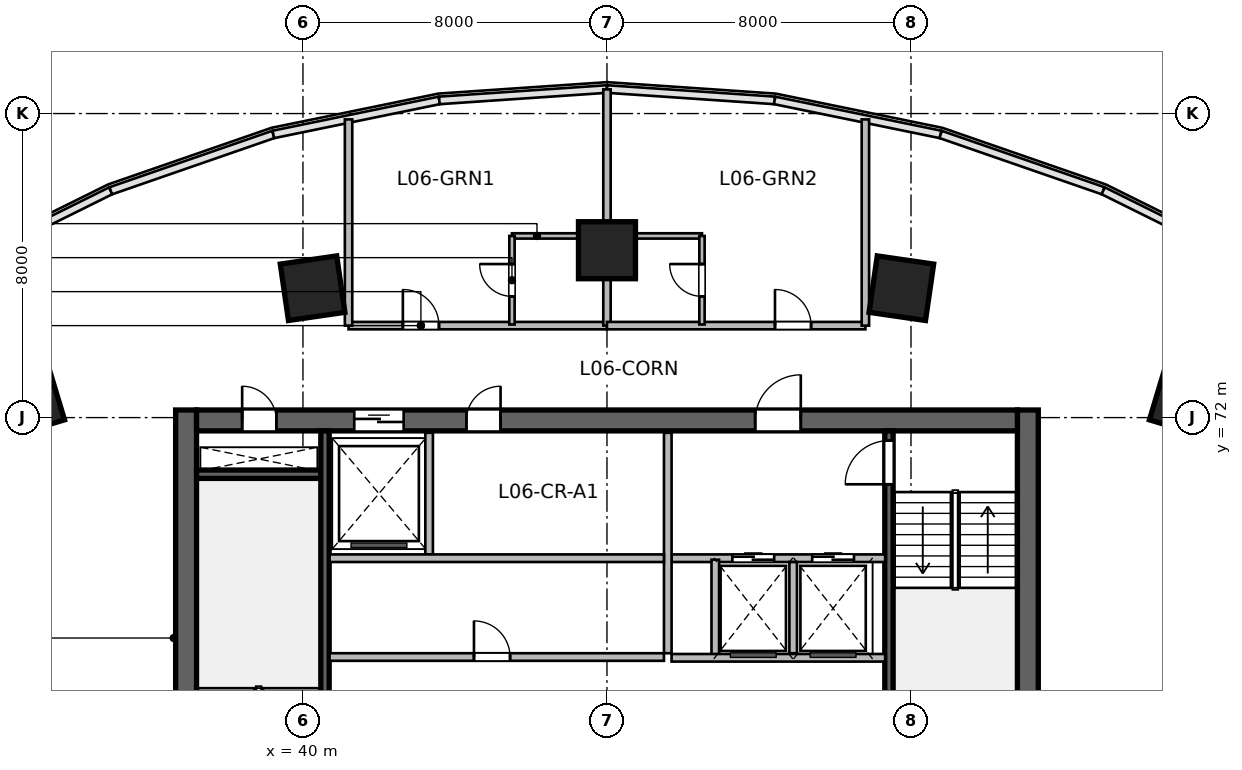
"""IFC4 building model, lengths in metres.
Left out: names, types, materials, properties, quantities, classifications, styles, units other than length and angle.
Written with IfcOpenShell. Run it as: python <this file> out.ifc"""

import sys

from ifc_helpers import new_model, si_unit, direction, frame, frame_2d, origin, origin_2d, place, context, subcontext, project, spatial, rectangle, extrude, source, transform, mapped, element, fill, save


model = new_model("IFC4")
c1 = context("Model", 3, precision=1e-05, world=origin(), true_north=direction((0.0, 1.0)))
c2 = subcontext(c1, "Body", "Model", "MODEL_VIEW")
j1 = project(units=[si_unit("LENGTHUNIT", "METRE"), si_unit("PLANEANGLEUNIT", "RADIAN")], contexts=[c1])
p1 = place(None, origin())
s1 = spatial("IfcSite", under=j1, at=p1, CompositionType="ELEMENT")
p2 = place(p1, origin())
s2 = spatial("IfcBuilding", under=s1, at=p2, CompositionType="ELEMENT")
p3 = place(p2, frame((0.0, 0.0, 35.4)))
s3 = spatial("IfcBuildingStorey", under=s2, at=p3, CompositionType="ELEMENT", Elevation=35.4)
m1 = source(origin(), c2, "Body", "SweptSolid", [
    extrude(rectangle(XDim=12.0, YDim=0.55, at=frame_2d((6.0, 0.0))), origin(), (0.0, 0.0, 1.0), 3.6),
])
for number, where, z_axis, x_axis in (
    (1, (36.925, 60.2, 0.0), (0.0, 0.0, 1.0), (0.0, 1.0, 0.0)),
    (2, (59.075, 60.2, 0.0), (0.0, 0.0, 1.0), (0.0, 1.0, 0.0)),
):
    element("IfcWall", number, at=place(p3, frame(where, z_axis=z_axis, x_axis=x_axis)), inside=s3, PredefinedType="SHEAR", context=c2, shape_type="MappedRepresentation", body=[
        mapped(m1, transform((0.0, 0.0, 0.0), scale=1.0)),
    ])
m2 = source(origin(), c2, "Body", "SweptSolid", [
    extrude(rectangle(XDim=21.6, YDim=0.55, at=frame_2d((10.8, 0.0))), origin(), (0.0, 0.0, 1.0), 3.6),
])
p4 = place(p3, frame((37.2, 71.925, 0.0), z_axis=(0.0, 0.0, 1.0), x_axis=(1.0, 0.0, 0.0)))
e3 = element("IfcWall", 3, at=p4, inside=s3, PredefinedType="SHEAR", context=c2, shape_type="MappedRepresentation", body=[
    mapped(m2, transform((0.0, 0.0, 0.0), scale=1.0)),
])
p5 = place(p4, frame((1.2, 0.0, 0.0)))
e4 = element("IfcOpeningElement", 4, at=p5, cuts=e3, PredefinedType="OPENING", context=c2, shape_type="SweptSolid", body=[
    extrude(rectangle(XDim=0.9, YDim=2.1, at=frame_2d((0.45, 1.05))), frame((0.0, 0.285, 0.0), z_axis=(0.0, -1.0, 0.0), x_axis=(1.0, 0.0, 0.0)), (0.0, 0.0, 1.0), 0.57),
])
p6 = place(p4, frame((14.7, 0.0, 0.0)))
e5 = element("IfcOpeningElement", 5, at=p6, cuts=e3, PredefinedType="OPENING", context=c2, shape_type="SweptSolid", body=[
    extrude(rectangle(XDim=1.2, YDim=2.15, at=frame_2d((0.6, 1.075))), frame((0.0, 0.285, 0.0), z_axis=(0.0, -1.0, 0.0), x_axis=(1.0, 0.0, 0.0)), (0.0, 0.0, 1.0), 0.57),
])
p7 = place(p4, frame((4.15, 0.0, 0.0)))
e6 = element("IfcOpeningElement", 6, at=p7, cuts=e3, PredefinedType="OPENING", context=c2, shape_type="SweptSolid", body=[
    extrude(rectangle(XDim=1.3, YDim=2.15, at=frame_2d((0.65, 1.075))), frame((0.0, 0.285, 0.0), z_axis=(0.0, -1.0, 0.0), x_axis=(1.0, 0.0, 0.0)), (0.0, 0.0, 1.0), 0.57),
])
p8 = place(p4, frame((7.1, 0.0, 0.0)))
e7 = element("IfcOpeningElement", 7, at=p8, cuts=e3, PredefinedType="OPENING", context=c2, shape_type="SweptSolid", body=[
    extrude(rectangle(XDim=0.9, YDim=2.1, at=frame_2d((0.45, 1.05))), frame((0.0, 0.285, 0.0), z_axis=(0.0, -1.0, 0.0), x_axis=(1.0, 0.0, 0.0)), (0.0, 0.0, 1.0), 0.57),
])
m3 = source(origin(), c2, "Body", "SweptSolid", [
    extrude(rectangle(XDim=3.27, YDim=0.22, at=frame_2d((1.635, 0.0))), origin(), (0.0, 0.0, 1.0), 3.6),
])
p9 = place(p3, frame((37.2, 70.51, 0.0), z_axis=(0.0, 0.0, 1.0), x_axis=(1.0, 0.0, 0.0)))
e8 = element("IfcWall", 8, at=p9, inside=s3, PredefinedType="SHEAR", context=c2, shape_type="MappedRepresentation", body=[
    mapped(m3, transform((0.0, 0.0, 0.0), scale=1.0)),
])
m4 = source(origin(), c2, "Body", "SweptSolid", [
    extrude(rectangle(XDim=10.9, YDim=0.22, at=frame_2d((5.45, 0.0))), origin(), (0.0, 0.0, 1.0), 3.6),
])
p10 = place(p3, frame((40.58, 60.75, 0.0), z_axis=(0.0, 0.0, 1.0), x_axis=(0.0, 1.0, 0.0)))
e9 = element("IfcWall", 9, at=p10, inside=s3, PredefinedType="SHEAR", context=c2, shape_type="MappedRepresentation", body=[
    mapped(m4, transform((0.0, 0.0, 0.0), scale=1.0)),
])
p11 = place(p3, frame((55.42, 60.75, 0.0), z_axis=(0.0, 0.0, 1.0), x_axis=(0.0, 1.0, 0.0)))
e10 = element("IfcWall", 10, at=p11, inside=s3, PredefinedType="SHEAR", context=c2, shape_type="MappedRepresentation", body=[
    mapped(m4, transform((0.0, 0.0, 0.0), scale=1.0)),
])
p12 = place(p11, frame((9.495, 0.0, 0.0)))
e11 = element("IfcOpeningElement", 11, at=p12, cuts=e10, PredefinedType="OPENING", context=c2, shape_type="SweptSolid", body=[
    extrude(rectangle(XDim=1.15, YDim=2.15, at=frame_2d((0.575, 1.075))), frame((0.0, 0.12, 0.0), z_axis=(0.0, -1.0, 0.0), x_axis=(1.0, 0.0, 0.0)), (0.0, 0.0, 1.0), 0.24),
])
m5 = source(origin(), c2, "Body", "SweptSolid", [
    extrude(rectangle(XDim=1.5, YDim=1.5, at=origin_2d()), origin(), (0.0, 0.0, 1.0), 3.6),
])
for number, where, z_axis, x_axis in (
    (12, (32.791, 72.442, 0.0), (0.0, 0.0, 1.0), (-0.289, 0.957, 0.0)),
    (13, (40.253, 75.404, 0.0), (0.0, 0.0, 1.0), (-0.143, 0.99, 0.0)),
    (14, (48.0, 76.404, 0.0), (0.0, 0.0, 1.0), (0.0, 1.0, 0.0)),
    (15, (55.747, 75.404, 0.0), (0.0, 0.0, 1.0), (0.143, 0.99, 0.0)),
    (16, (63.209, 72.442, 0.0), (0.0, 0.0, 1.0), (0.289, 0.957, 0.0)),
):
    element("IfcColumn", number, at=place(p3, frame(where, z_axis=z_axis, x_axis=x_axis)), inside=s3, PredefinedType="COLUMN", context=c2, shape_type="MappedRepresentation", body=[
        mapped(m5, transform((0.0, 0.0, 0.0), scale=1.0)),
    ])
m6 = source(origin(), c2, "Body", "SweptSolid", [
    extrude(rectangle(XDim=5.62, YDim=0.2, at=frame_2d((2.81, 0.0))), origin(), (0.0, 0.0, 1.0), 3.36),
])
p13 = place(p3, frame((49.7, 68.3, 0.0), z_axis=(0.0, 0.0, 1.0), x_axis=(1.0, 0.0, 0.0)))
e17 = element("IfcWall", 17, at=p13, inside=s3, PredefinedType="SOLIDWALL", context=c2, shape_type="MappedRepresentation", body=[
    mapped(m6, transform((0.0, 0.0, 0.0), scale=1.0)),
])
p14 = place(p13, frame((1.6, 0.0, 0.0)))
e18 = element("IfcOpeningElement", 18, at=p14, cuts=e17, PredefinedType="OPENING", context=c2, shape_type="SweptSolid", body=[
    extrude(rectangle(XDim=1.1, YDim=2.15, at=frame_2d((0.55, 1.075))), frame((0.0, 0.11, 0.0), z_axis=(0.0, -1.0, 0.0), x_axis=(1.0, 0.0, 0.0)), (0.0, 0.0, 1.0), 0.22),
])
p15 = place(p13, frame((3.7, 0.0, 0.0)))
e19 = element("IfcOpeningElement", 19, at=p15, cuts=e17, PredefinedType="OPENING", context=c2, shape_type="SweptSolid", body=[
    extrude(rectangle(XDim=1.1, YDim=2.15, at=frame_2d((0.55, 1.075))), frame((0.0, 0.11, 0.0), z_axis=(0.0, -1.0, 0.0), x_axis=(1.0, 0.0, 0.0)), (0.0, 0.0, 1.0), 0.22),
])
m7 = source(origin(), c2, "Body", "SweptSolid", [
    extrude(rectangle(XDim=5.8, YDim=0.2, at=frame_2d((2.9, 0.0))), origin(), (0.0, 0.0, 1.0), 3.36),
])
p16 = place(p3, frame((49.6, 65.8, 0.0), z_axis=(0.0, 0.0, 1.0), x_axis=(0.0, 1.0, 0.0)))
e20 = element("IfcWall", 20, at=p16, inside=s3, PredefinedType="SOLIDWALL", context=c2, shape_type="MappedRepresentation", body=[
    mapped(m7, transform((0.0, 0.0, 0.0), scale=1.0)),
])
m8 = source(origin(), c2, "Body", "SweptSolid", [
    extrude(rectangle(XDim=2.58, YDim=0.2, at=frame_2d((1.29, 0.0))), origin(), (0.0, 0.0, 1.0), 3.36),
])
p17 = place(p3, frame((50.85, 65.68, 0.0), z_axis=(0.0, 0.0, 1.0), x_axis=(0.0, 1.0, 0.0)))
e21 = element("IfcWall", 21, at=p17, inside=s3, PredefinedType="SOLIDWALL", context=c2, shape_type="MappedRepresentation", body=[
    mapped(m8, transform((0.0, 0.0, 0.0), scale=1.0)),
])
m9 = source(origin(), c2, "Body", "SweptSolid", [
    extrude(rectangle(XDim=2.4, YDim=0.2, at=frame_2d((1.2, 0.0))), origin(), (0.0, 0.0, 1.0), 3.36),
])
p18 = place(p3, frame((52.9, 65.8, 0.0), z_axis=(0.0, 0.0, 1.0), x_axis=(0.0, 1.0, 0.0)))
e22 = element("IfcWall", 22, at=p18, inside=s3, PredefinedType="SOLIDWALL", context=c2, shape_type="MappedRepresentation", body=[
    mapped(m9, transform((0.0, 0.0, 0.0), scale=1.0)),
])
p19 = place(p3, frame((49.7, 65.68, 0.0), z_axis=(0.0, 0.0, 1.0), x_axis=(1.0, 0.0, 0.0)))
e23 = element("IfcWall", 23, at=p19, inside=s3, PredefinedType="SOLIDWALL", context=c2, shape_type="MappedRepresentation", body=[
    mapped(m6, transform((0.0, 0.0, 0.0), scale=1.0)),
])
m10 = source(origin(), c2, "Body", "SweptSolid", [
    extrude(rectangle(XDim=3.2, YDim=0.2, at=frame_2d((1.6, 0.0))), origin(), (0.0, 0.0, 1.0), 3.36),
])
p20 = place(p3, frame((43.32, 68.4, 0.0), z_axis=(0.0, 0.0, 1.0), x_axis=(0.0, 1.0, 0.0)))
e24 = element("IfcWall", 24, at=p20, inside=s3, PredefinedType="SOLIDWALL", context=c2, shape_type="MappedRepresentation", body=[
    mapped(m10, transform((0.0, 0.0, 0.0), scale=1.0)),
])
m11 = source(origin(), c2, "Body", "SweptSolid", [
    extrude(rectangle(XDim=8.8, YDim=0.2, at=frame_2d((4.4, 0.0))), origin(), (0.0, 0.0, 1.0), 3.36),
])
p21 = place(p3, frame((40.7, 68.3, 0.0), z_axis=(0.0, 0.0, 1.0), x_axis=(1.0, 0.0, 0.0)))
e25 = element("IfcWall", 25, at=p21, inside=s3, PredefinedType="SOLIDWALL", context=c2, shape_type="MappedRepresentation", body=[
    mapped(m11, transform((0.0, 0.0, 0.0), scale=1.0)),
])
p22 = place(p3, frame((40.7, 65.7, 0.0), z_axis=(0.0, 0.0, 1.0), x_axis=(1.0, 0.0, 0.0)))
e26 = element("IfcWall", 26, at=p22, inside=s3, PredefinedType="SOLIDWALL", context=c2, shape_type="MappedRepresentation", body=[
    mapped(m11, transform((0.0, 0.0, 0.0), scale=1.0)),
])
p23 = place(p22, frame((3.8, 0.0, 0.0)))
e27 = element("IfcOpeningElement", 27, at=p23, cuts=e26, PredefinedType="OPENING", context=c2, shape_type="SweptSolid", body=[
    extrude(rectangle(XDim=0.95, YDim=2.15, at=frame_2d((0.475, 1.075))), frame((0.0, 0.11, 0.0), z_axis=(0.0, -1.0, 0.0), x_axis=(1.0, 0.0, 0.0)), (0.0, 0.0, 1.0), 0.22),
])
m12 = source(origin(), c2, "Body", "SweptSolid", [
    extrude(rectangle(XDim=6.8, YDim=0.195, at=frame_2d((3.4, 0.0))), origin(), (0.0, 0.0, 1.0), 3.36),
])
p24 = place(p3, frame((41.2, 74.42, 0.0), z_axis=(0.0, 0.0, 1.0), x_axis=(1.0, 0.0, 0.0)))
e28 = element("IfcWall", 28, at=p24, inside=s3, PredefinedType="PARTITIONING", context=c2, shape_type="MappedRepresentation", body=[
    mapped(m12, transform((0.0, 0.0, 0.0), scale=1.0)),
])
p25 = place(p24, frame((1.429, 0.0, 0.0)))
e29 = element("IfcOpeningElement", 29, at=p25, cuts=e28, PredefinedType="OPENING", context=c2, shape_type="SweptSolid", body=[
    extrude(rectangle(XDim=0.95, YDim=2.15, at=frame_2d((0.475, 1.075))), frame((0.0, 0.107, 0.0), z_axis=(0.0, -1.0, 0.0), x_axis=(1.0, 0.0, 0.0)), (0.0, 0.0, 1.0), 0.215),
])
m13 = source(origin(), c2, "Body", "SweptSolid", [
    extrude(rectangle(XDim=6.216, YDim=0.195, at=frame_2d((3.108, 0.0))), origin(), (0.0, 0.0, 1.0), 2.644),
])
p26 = place(p3, frame((48.0, 74.42, 0.0), z_axis=(0.0, 0.0, 1.0), x_axis=(0.0, 1.0, 0.0)))
e30 = element("IfcWall", 30, at=p26, inside=s3, PredefinedType="PARTITIONING", context=c2, shape_type="MappedRepresentation", body=[
    mapped(m13, transform((0.0, 0.0, 0.0), scale=1.0)),
])
m14 = source(origin(), c2, "Body", "SweptSolid", [
    extrude(rectangle(XDim=5.426, YDim=0.195, at=frame_2d((2.713, 0.0))), origin(), (0.0, 0.0, 1.0), 3.36),
])
p27 = place(p3, frame((41.2, 74.42, 0.0), z_axis=(0.0, 0.0, 1.0), x_axis=(0.0, 1.0, 0.0)))
e31 = element("IfcWall", 31, at=p27, inside=s3, PredefinedType="PARTITIONING", context=c2, shape_type="MappedRepresentation", body=[
    mapped(m14, transform((0.0, 0.0, 0.0), scale=1.0)),
])
m15 = source(origin(), c2, "Body", "SweptSolid", [
    extrude(rectangle(XDim=2.35, YDim=0.14, at=frame_2d((1.175, 0.0))), origin(), (0.0, 0.0, 1.0), 3.36),
])
p28 = place(p3, frame((45.5, 76.78, 0.0), z_axis=(0.0, 0.0, 1.0), x_axis=(1.0, 0.0, 0.0)))
e32 = element("IfcWall", 32, at=p28, inside=s3, PredefinedType="PARTITIONING", context=c2, shape_type="MappedRepresentation", body=[
    mapped(m15, transform((0.0, 0.0, 0.0), scale=1.0)),
])
m16 = source(origin(), c2, "Body", "SweptSolid", [
    extrude(rectangle(XDim=2.33, YDim=0.14, at=frame_2d((1.165, 0.0))), origin(), (0.0, 0.0, 1.0), 3.36),
])
p29 = place(p3, frame((45.5, 74.45, 0.0), z_axis=(0.0, 0.0, 1.0), x_axis=(0.0, 1.0, 0.0)))
e33 = element("IfcWall", 33, at=p29, inside=s3, PredefinedType="PARTITIONING", context=c2, shape_type="MappedRepresentation", body=[
    mapped(m16, transform((0.0, 0.0, 0.0), scale=1.0)),
])
p30 = place(p29, frame((0.74, 0.0, 0.0)))
e34 = element("IfcOpeningElement", 34, at=p30, cuts=e33, PredefinedType="OPENING", context=c2, shape_type="SweptSolid", body=[
    extrude(rectangle(XDim=0.85, YDim=2.05, at=frame_2d((0.425, 1.025))), frame((0.0, 0.08, 0.0), z_axis=(0.0, -1.0, 0.0), x_axis=(1.0, 0.0, 0.0)), (0.0, 0.0, 1.0), 0.16),
])
p31 = place(p3, frame((48.0, 74.42, 0.0), z_axis=(0.0, 0.0, 1.0), x_axis=(1.0, 0.0, 0.0)))
e35 = element("IfcWall", 35, at=p31, inside=s3, PredefinedType="PARTITIONING", context=c2, shape_type="MappedRepresentation", body=[
    mapped(m12, transform((0.0, 0.0, 0.0), scale=1.0)),
])
p32 = place(p31, frame((4.421, 0.0, 0.0)))
e36 = element("IfcOpeningElement", 36, at=p32, cuts=e35, PredefinedType="OPENING", context=c2, shape_type="SweptSolid", body=[
    extrude(rectangle(XDim=0.95, YDim=2.15, at=frame_2d((0.475, 1.075))), frame((0.0, 0.107, 0.0), z_axis=(0.0, -1.0, 0.0), x_axis=(1.0, 0.0, 0.0)), (0.0, 0.0, 1.0), 0.215),
])
p33 = place(p3, frame((54.8, 74.42, 0.0), z_axis=(0.0, 0.0, 1.0), x_axis=(0.0, 1.0, 0.0)))
e37 = element("IfcWall", 37, at=p33, inside=s3, PredefinedType="PARTITIONING", context=c2, shape_type="MappedRepresentation", body=[
    mapped(m14, transform((0.0, 0.0, 0.0), scale=1.0)),
])
p34 = place(p3, frame((48.15, 76.78, 0.0), z_axis=(0.0, 0.0, 1.0), x_axis=(1.0, 0.0, 0.0)))
e38 = element("IfcWall", 38, at=p34, inside=s3, PredefinedType="PARTITIONING", context=c2, shape_type="MappedRepresentation", body=[
    mapped(m15, transform((0.0, 0.0, 0.0), scale=1.0)),
])
p35 = place(p3, frame((50.5, 74.45, 0.0), z_axis=(0.0, 0.0, 1.0), x_axis=(0.0, 1.0, 0.0)))
e39 = element("IfcWall", 39, at=p35, inside=s3, PredefinedType="PARTITIONING", context=c2, shape_type="MappedRepresentation", body=[
    mapped(m16, transform((0.0, 0.0, 0.0), scale=1.0)),
])
p36 = place(p35, frame((0.74, 0.0, 0.0)))
e40 = element("IfcOpeningElement", 40, at=p36, cuts=e39, PredefinedType="OPENING", context=c2, shape_type="SweptSolid", body=[
    extrude(rectangle(XDim=0.85, YDim=2.05, at=frame_2d((0.425, 1.025))), frame((0.0, 0.08, 0.0), z_axis=(0.0, -1.0, 0.0), x_axis=(1.0, 0.0, 0.0)), (0.0, 0.0, 1.0), 0.16),
])
m17 = source(origin(), c2, "Body", "SweptSolid", [
    extrude(rectangle(XDim=0.9, YDim=2.1, at=frame_2d((0.45, 1.05))), frame((0.0, 0.025, 0.0), z_axis=(0.0, -1.0, 0.0), x_axis=(1.0, 0.0, 0.0)), (0.0, 0.0, 1.0), 0.05),
])
p37 = place(p5, origin())
e41 = element("IfcDoor", 41, at=p37, inside=s3, OperationType="SINGLE_SWING_LEFT", PredefinedType="DOOR", context=c2, shape_type="MappedRepresentation", body=[
    mapped(m17, transform((0.0, 0.0, 0.0), scale=1.0)),
])
fill(e4, e41)
m18 = source(origin(), c2, "Body", "SweptSolid", [
    extrude(rectangle(XDim=1.15, YDim=2.15, at=frame_2d((0.575, 1.075))), frame((0.0, 0.025, 0.0), z_axis=(0.0, -1.0, 0.0), x_axis=(1.0, 0.0, 0.0)), (0.0, 0.0, 1.0), 0.05),
])
p38 = place(p12, origin())
e42 = element("IfcDoor", 42, at=p38, inside=s3, OperationType="SINGLE_SWING_LEFT", PredefinedType="DOOR", context=c2, shape_type="MappedRepresentation", body=[
    mapped(m18, transform((0.0, 0.0, 0.0), scale=1.0)),
])
fill(e11, e42)
m19 = source(origin(), c2, "Body", "SweptSolid", [
    extrude(rectangle(XDim=1.2, YDim=2.15, at=frame_2d((0.6, 1.075))), frame((0.0, 0.025, 0.0), z_axis=(0.0, -1.0, 0.0), x_axis=(1.0, 0.0, 0.0)), (0.0, 0.0, 1.0), 0.05),
])
p39 = place(p6, origin())
e43 = element("IfcDoor", 43, at=p39, inside=s3, OperationType="SINGLE_SWING_RIGHT", PredefinedType="DOOR", context=c2, shape_type="MappedRepresentation", body=[
    mapped(m19, transform((0.0, 0.0, 0.0), scale=1.0)),
])
fill(e5, e43)
m20 = source(origin(), c2, "Body", "SweptSolid", [
    extrude(rectangle(XDim=1.1, YDim=2.15, at=frame_2d((0.55, 1.075))), frame((0.0, 0.025, 0.0), z_axis=(0.0, -1.0, 0.0), x_axis=(1.0, 0.0, 0.0)), (0.0, 0.0, 1.0), 0.05),
])
p40 = place(p14, origin())
e44 = element("IfcDoor", 44, at=p40, inside=s3, OperationType="DOUBLE_DOOR_SLIDING", PredefinedType="DOOR", context=c2, shape_type="MappedRepresentation", body=[
    mapped(m20, transform((0.0, 0.0, 0.0), scale=1.0)),
])
fill(e18, e44)
p41 = place(p15, origin())
e45 = element("IfcDoor", 45, at=p41, inside=s3, OperationType="DOUBLE_DOOR_SLIDING", PredefinedType="DOOR", context=c2, shape_type="MappedRepresentation", body=[
    mapped(m20, transform((0.0, 0.0, 0.0), scale=1.0)),
])
fill(e19, e45)
m21 = source(origin(), c2, "Body", "SweptSolid", [
    extrude(rectangle(XDim=1.3, YDim=2.15, at=frame_2d((0.65, 1.075))), frame((0.0, 0.025, 0.0), z_axis=(0.0, -1.0, 0.0), x_axis=(1.0, 0.0, 0.0)), (0.0, 0.0, 1.0), 0.05),
])
p42 = place(p7, origin())
e46 = element("IfcDoor", 46, at=p42, inside=s3, OperationType="DOUBLE_DOOR_SLIDING", PredefinedType="DOOR", context=c2, shape_type="MappedRepresentation", body=[
    mapped(m21, transform((0.0, 0.0, 0.0), scale=1.0)),
])
fill(e6, e46)
p43 = place(p8, origin())
e47 = element("IfcDoor", 47, at=p43, inside=s3, OperationType="SINGLE_SWING_RIGHT", PredefinedType="DOOR", context=c2, shape_type="MappedRepresentation", body=[
    mapped(m17, transform((0.0, 0.0, 0.0), scale=1.0)),
])
fill(e7, e47)
m22 = source(origin(), c2, "Body", "SweptSolid", [
    extrude(rectangle(XDim=0.95, YDim=2.15, at=frame_2d((0.475, 1.075))), frame((0.0, 0.025, 0.0), z_axis=(0.0, -1.0, 0.0), x_axis=(1.0, 0.0, 0.0)), (0.0, 0.0, 1.0), 0.05),
])
p44 = place(p23, origin())
e48 = element("IfcDoor", 48, at=p44, inside=s3, OperationType="SINGLE_SWING_LEFT", PredefinedType="DOOR", context=c2, shape_type="MappedRepresentation", body=[
    mapped(m22, transform((0.0, 0.0, 0.0), scale=1.0)),
])
fill(e27, e48)
p45 = place(p25, origin())
e49 = element("IfcDoor", 49, at=p45, inside=s3, OperationType="SINGLE_SWING_LEFT", PredefinedType="DOOR", context=c2, shape_type="MappedRepresentation", body=[
    mapped(m22, transform((0.0, 0.0, 0.0), scale=1.0)),
])
fill(e29, e49)
m23 = source(origin(), c2, "Body", "SweptSolid", [
    extrude(rectangle(XDim=0.85, YDim=2.05, at=frame_2d((0.425, 1.025))), frame((0.0, 0.025, 0.0), z_axis=(0.0, -1.0, 0.0), x_axis=(1.0, 0.0, 0.0)), (0.0, 0.0, 1.0), 0.05),
])
p46 = place(p30, origin())
e50 = element("IfcDoor", 50, at=p46, inside=s3, OperationType="SINGLE_SWING_RIGHT", PredefinedType="DOOR", context=c2, shape_type="MappedRepresentation", body=[
    mapped(m23, transform((0.0, 0.0, 0.0), scale=1.0)),
])
fill(e34, e50)
p47 = place(p32, origin())
e51 = element("IfcDoor", 51, at=p47, inside=s3, OperationType="SINGLE_SWING_LEFT", PredefinedType="DOOR", context=c2, shape_type="MappedRepresentation", body=[
    mapped(m22, transform((0.0, 0.0, 0.0), scale=1.0)),
])
fill(e36, e51)
p48 = place(p36, origin())
e52 = element("IfcDoor", 52, at=p48, inside=s3, OperationType="SINGLE_SWING_RIGHT", PredefinedType="DOOR", context=c2, shape_type="MappedRepresentation", body=[
    mapped(m23, transform((0.0, 0.0, 0.0), scale=1.0)),
])
fill(e40, e52)
save(model, sys.argv[1])
